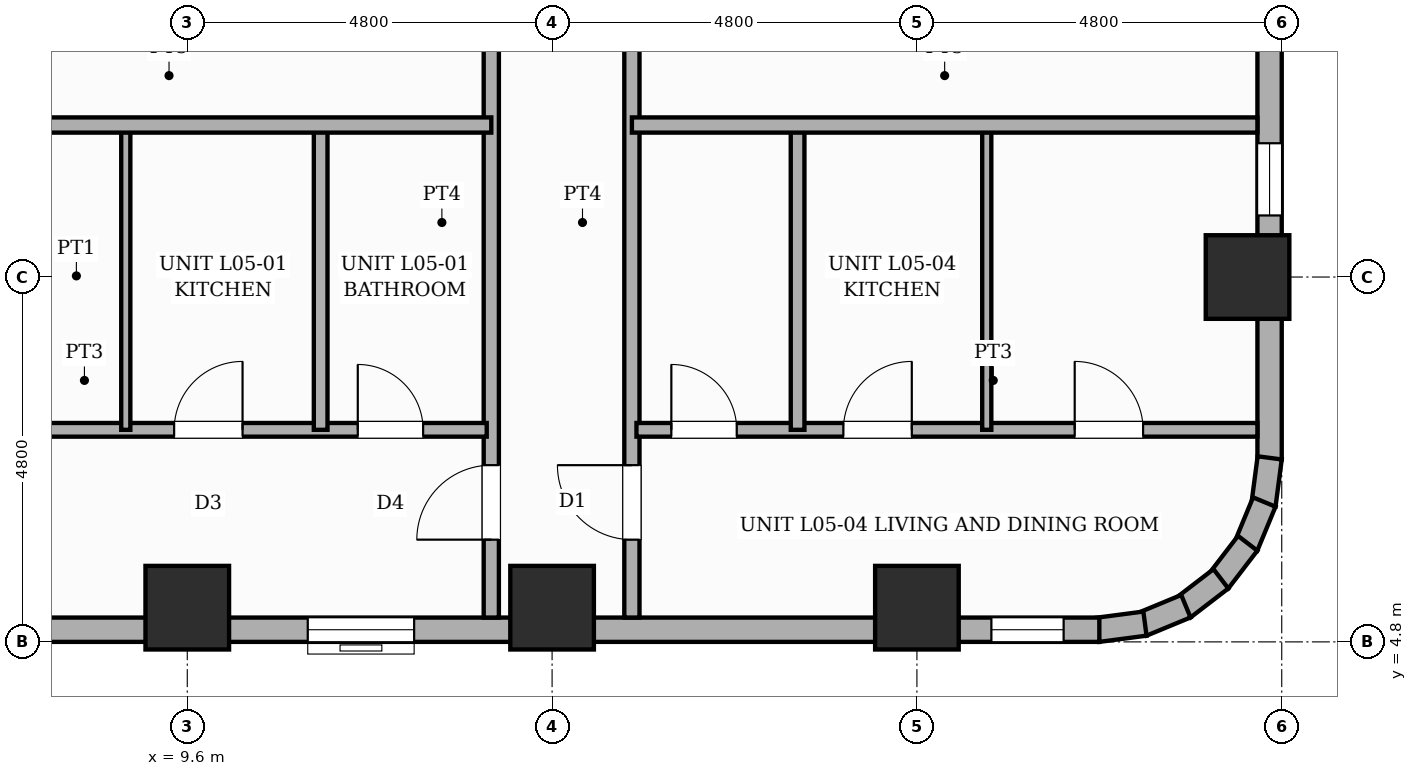
"""IFC4 building model, lengths in metres.
Left out: names, types, materials, properties, quantities, classifications, styles, units other than length and angle.
Written with IfcOpenShell. Run it as: python <this file> out.ifc"""

import sys

from ifc_helpers import new_model, si_unit, direction, frame, frame_2d, origin, origin_2d, place, context, subcontext, project, spatial, rectangle, extrude, element, fill, save


model = new_model("IFC4")
c1 = context("Model", 3, precision=1e-05, world=origin(), true_north=direction((0.0, 1.0)))
c2 = subcontext(c1, "Body", "Model", "MODEL_VIEW")
j1 = project(units=[si_unit("LENGTHUNIT", "METRE"), si_unit("PLANEANGLEUNIT", "RADIAN")], contexts=[c1])
p1 = place(None, origin())
s1 = spatial("IfcSite", under=j1, at=p1, CompositionType="ELEMENT")
p2 = place(p1, origin())
s2 = spatial("IfcBuilding", under=s1, at=p2, CompositionType="ELEMENT")
p3 = place(p2, frame((0.0, 0.0, 25.0)))
s3 = spatial("IfcBuildingStorey", under=s2, at=p3, CompositionType="ELEMENT", Elevation=25.0)
for number, where, z_axis, x_axis in (
    (1, (9.6, 5.25, 0.0), (0.0, 0.0, 1.0), (1.0, 0.0, 0.0)),
    (2, (14.4, 5.25, 0.0), (0.0, 0.0, 1.0), (1.0, 0.0, 0.0)),
    (3, (19.2, 5.25, 0.0), (0.0, 0.0, 1.0), (1.0, 0.0, 0.0)),
    (4, (23.55, 9.6, 0.0), (0.0, 0.0, 1.0), (1.0, 0.0, 0.0)),
):
    element("IfcColumn", number, at=place(p3, frame(where, z_axis=z_axis, x_axis=x_axis)), inside=s3, PredefinedType="COLUMN", context=c2, shape_type="SweptSolid", body=[
        extrude(rectangle(XDim=1.1, YDim=1.1, at=origin_2d()), origin(), (0.0, 0.0, 1.0), 3.6),
    ])
p4 = place(p3, frame((23.84, 26.4, 0.0), z_axis=(0.0, 0.0, 1.0), x_axis=(0.0, -1.0, 0.0)))
e5 = element("IfcWall", 5, at=p4, inside=s3, PredefinedType="STANDARD", context=c2, shape_type="SweptSolid", body=[
    extrude(rectangle(XDim=19.2, YDim=0.32, at=frame_2d((9.6, 0.0))), origin(), (0.0, 0.0, 1.0), 2.53),
])
p5 = place(p4, frame((15.04, 0.0, 0.45)))
e6 = element("IfcOpeningElement", 6, at=p5, cuts=e5, PredefinedType="OPENING", context=c2, shape_type="SweptSolid", body=[
    extrude(rectangle(XDim=0.95, YDim=1.8, at=frame_2d((0.475, 0.9))), frame((0.0, 0.17, 0.0), z_axis=(0.0, -1.0, 0.0), x_axis=(1.0, 0.0, 0.0)), (0.0, 0.0, 1.0), 0.34),
])
p6 = place(p4, frame((8.22, 0.0, 0.65)))
e7 = element("IfcOpeningElement", 7, at=p6, cuts=e5, PredefinedType="OPENING", context=c2, shape_type="SweptSolid", body=[
    extrude(rectangle(XDim=1.4, YDim=1.1, at=frame_2d((0.7, 0.55))), frame((0.0, 0.17, 0.0), z_axis=(0.0, -1.0, 0.0), x_axis=(1.0, 0.0, 0.0)), (0.0, 0.0, 1.0), 0.34),
])
p7 = place(p4, frame((4.795, 0.0, 0.65)))
e8 = element("IfcOpeningElement", 8, at=p7, cuts=e5, PredefinedType="OPENING", context=c2, shape_type="SweptSolid", body=[
    extrude(rectangle(XDim=1.4, YDim=1.1, at=frame_2d((0.7, 0.55))), frame((0.0, 0.17, 0.0), z_axis=(0.0, -1.0, 0.0), x_axis=(1.0, 0.0, 0.0)), (0.0, 0.0, 1.0), 0.34),
])
p8 = place(p4, frame((10.26, 0.0, 0.45)))
e9 = element("IfcOpeningElement", 9, at=p8, cuts=e5, PredefinedType="OPENING", context=c2, shape_type="SweptSolid", body=[
    extrude(rectangle(XDim=0.95, YDim=1.8, at=frame_2d((0.475, 0.9))), frame((0.0, 0.17, 0.0), z_axis=(0.0, -1.0, 0.0), x_axis=(1.0, 0.0, 0.0)), (0.0, 0.0, 1.0), 0.34),
])
p9 = place(p4, frame((0.88, 0.0, 0.45)))
e10 = element("IfcOpeningElement", 10, at=p9, cuts=e5, PredefinedType="OPENING", context=c2, shape_type="SweptSolid", body=[
    extrude(rectangle(XDim=0.75, YDim=1.8, at=frame_2d((0.375, 0.9))), frame((0.0, 0.17, 0.0), z_axis=(0.0, -1.0, 0.0), x_axis=(1.0, 0.0, 0.0)), (0.0, 0.0, 1.0), 0.34),
])
p10 = place(p3, frame((23.841, 7.221, 0.0), z_axis=(0.0, 0.0, 1.0), x_axis=(-0.130504898859, -0.991447664465, 0.0)))
e11 = element("IfcWall", 11, at=p10, inside=s3, PredefinedType="STANDARD", context=c2, shape_type="SweptSolid", body=[
    extrude(rectangle(XDim=0.627, YDim=0.32, at=frame_2d((0.313, 0.0))), origin(), (0.0, 0.0, 1.0), 3.35),
])
p11 = place(p3, frame((23.771, 6.64, 0.0), z_axis=(0.0, 0.0, 1.0), x_axis=(-0.382787856107, -0.923836271867, 0.0)))
e12 = element("IfcWall", 12, at=p11, inside=s3, PredefinedType="STANDARD", context=c2, shape_type="SweptSolid", body=[
    extrude(rectangle(XDim=0.626, YDim=0.32, at=frame_2d((0.313, 0.0))), origin(), (0.0, 0.0, 1.0), 3.35),
])
p12 = place(p3, frame((23.552, 6.097, 0.0), z_axis=(0.0, 0.0, 1.0), x_axis=(-0.608693302629, -0.793405610854, 0.0)))
e13 = element("IfcWall", 13, at=p12, inside=s3, PredefinedType="STANDARD", context=c2, shape_type="SweptSolid", body=[
    extrude(rectangle(XDim=0.626, YDim=0.32, at=frame_2d((0.313, 0.0))), origin(), (0.0, 0.0, 1.0), 3.35),
])
p13 = place(p3, frame((23.2, 5.63, 0.0), z_axis=(0.0, 0.0, 1.0), x_axis=(-0.7932174212, -0.608938521285, 0.0)))
e14 = element("IfcWall", 14, at=p13, inside=s3, PredefinedType="STANDARD", context=c2, shape_type="SweptSolid", body=[
    extrude(rectangle(XDim=0.627, YDim=0.32, at=frame_2d((0.313, 0.0))), origin(), (0.0, 0.0, 1.0), 3.35),
])
for number, where, z_axis, x_axis in (
    (15, (22.739, 5.269, 0.0), (0.0, 0.0, 1.0), (-0.924, -0.383, 0.0)),
    (16, (22.2, 5.04, 0.0), (0.0, 0.0, 1.0), (-0.991, -0.131, 0.0)),
):
    element("IfcWall", number, at=place(p3, frame(where, z_axis=z_axis, x_axis=x_axis)), inside=s3, PredefinedType="STANDARD", context=c2, shape_type="SweptSolid", body=[
        extrude(rectangle(XDim=0.626, YDim=0.32, at=frame_2d((0.313, 0.0))), origin(), (0.0, 0.0, 1.0), 3.35),
    ])
p14 = place(p3, frame((21.6, 4.96, 0.0), z_axis=(0.0, 0.0, 1.0), x_axis=(-1.0, 0.0, 0.0)))
e17 = element("IfcWall", 17, at=p14, inside=s3, PredefinedType="STANDARD", context=c2, shape_type="SweptSolid", body=[
    extrude(rectangle(XDim=14.4, YDim=0.32, at=frame_2d((7.2, 0.0))), origin(), (0.0, 0.0, 1.0), 2.53),
])
p15 = place(p14, frame((9.015, 0.0, 0.65)))
e18 = element("IfcOpeningElement", 18, at=p15, cuts=e17, PredefinedType="OPENING", context=c2, shape_type="SweptSolid", body=[
    extrude(rectangle(XDim=1.4, YDim=1.1, at=frame_2d((0.7, 0.55))), frame((0.0, 0.17, 0.0), z_axis=(0.0, -1.0, 0.0), x_axis=(1.0, 0.0, 0.0)), (0.0, 0.0, 1.0), 0.34),
])
p16 = place(p14, frame((0.47, 0.0, 0.45)))
e19 = element("IfcOpeningElement", 19, at=p16, cuts=e17, PredefinedType="OPENING", context=c2, shape_type="SweptSolid", body=[
    extrude(rectangle(XDim=0.95, YDim=1.8, at=frame_2d((0.475, 0.9))), frame((0.0, 0.17, 0.0), z_axis=(0.0, -1.0, 0.0), x_axis=(1.0, 0.0, 0.0)), (0.0, 0.0, 1.0), 0.34),
])
p17 = place(p3, frame((13.6, 5.12, 0.0), z_axis=(0.0, 0.0, 1.0), x_axis=(0.0, 1.0, 0.0)))
e20 = element("IfcWall", 20, at=p17, inside=s3, PredefinedType="PARTITIONING", context=c2, shape_type="SweptSolid", body=[
    extrude(rectangle(XDim=20.63, YDim=0.2, at=frame_2d((10.315, 0.0))), origin(), (0.0, 0.0, 1.0), 3.35),
])
p18 = place(p17, frame((1.025, 0.0, 0.0)))
e21 = element("IfcOpeningElement", 21, at=p18, cuts=e20, PredefinedType="OPENING", context=c2, shape_type="SweptSolid", body=[
    extrude(rectangle(XDim=0.98, YDim=2.18, at=frame_2d((0.49, 1.09))), frame((0.0, 0.11, 0.0), z_axis=(0.0, -1.0, 0.0), x_axis=(1.0, 0.0, 0.0)), (0.0, 0.0, 1.0), 0.22),
])
p19 = place(p17, frame((8.39, 0.0, 0.0)))
e22 = element("IfcOpeningElement", 22, at=p19, cuts=e20, PredefinedType="OPENING", context=c2, shape_type="SweptSolid", body=[
    extrude(rectangle(XDim=0.98, YDim=2.18, at=frame_2d((0.49, 1.09))), frame((0.0, 0.11, 0.0), z_axis=(0.0, -1.0, 0.0), x_axis=(1.0, 0.0, 0.0)), (0.0, 0.0, 1.0), 0.22),
])
p20 = place(p17, frame((14.71, 0.0, 0.0)))
e23 = element("IfcOpeningElement", 23, at=p20, cuts=e20, PredefinedType="OPENING", context=c2, shape_type="SweptSolid", body=[
    extrude(rectangle(XDim=0.98, YDim=2.18, at=frame_2d((0.49, 1.09))), frame((0.0, 0.11, 0.0), z_axis=(0.0, -1.0, 0.0), x_axis=(1.0, 0.0, 0.0)), (0.0, 0.0, 1.0), 0.22),
])
p21 = place(p3, frame((15.45, 5.12, 0.0), z_axis=(0.0, 0.0, 1.0), x_axis=(0.0, 1.0, 0.0)))
e24 = element("IfcWall", 24, at=p21, inside=s3, PredefinedType="PARTITIONING", context=c2, shape_type="SweptSolid", body=[
    extrude(rectangle(XDim=20.63, YDim=0.2, at=frame_2d((10.315, 0.0))), origin(), (0.0, 0.0, 1.0), 3.35),
])
p22 = place(p21, frame((1.025, 0.0, 0.0)))
e25 = element("IfcOpeningElement", 25, at=p22, cuts=e24, PredefinedType="OPENING", context=c2, shape_type="SweptSolid", body=[
    extrude(rectangle(XDim=0.98, YDim=2.18, at=frame_2d((0.49, 1.09))), frame((0.0, 0.11, 0.0), z_axis=(0.0, -1.0, 0.0), x_axis=(1.0, 0.0, 0.0)), (0.0, 0.0, 1.0), 0.22),
])
p23 = place(p21, frame((8.39, 0.0, 0.0)))
e26 = element("IfcOpeningElement", 26, at=p23, cuts=e24, PredefinedType="OPENING", context=c2, shape_type="SweptSolid", body=[
    extrude(rectangle(XDim=0.98, YDim=2.18, at=frame_2d((0.49, 1.09))), frame((0.0, 0.11, 0.0), z_axis=(0.0, -1.0, 0.0), x_axis=(1.0, 0.0, 0.0)), (0.0, 0.0, 1.0), 0.22),
])
p24 = place(p21, frame((14.71, 0.0, 0.0)))
e27 = element("IfcOpeningElement", 27, at=p24, cuts=e24, PredefinedType="OPENING", context=c2, shape_type="SweptSolid", body=[
    extrude(rectangle(XDim=0.98, YDim=2.18, at=frame_2d((0.49, 1.09))), frame((0.0, 0.11, 0.0), z_axis=(0.0, -1.0, 0.0), x_axis=(1.0, 0.0, 0.0)), (0.0, 0.0, 1.0), 0.22),
])
p25 = place(p3, frame((5.12, 7.59, 0.0), z_axis=(0.0, 0.0, 1.0), x_axis=(1.0, 0.0, 0.0)))
e28 = element("IfcWall", 28, at=p25, inside=s3, PredefinedType="PLUMBINGWALL", context=c2, shape_type="SweptSolid", body=[
    extrude(rectangle(XDim=8.42, YDim=0.18, at=frame_2d((4.21, 0.0))), origin(), (0.0, 0.0, 1.0), 3.35),
])
p26 = place(p25, frame((1.046, 0.0, 0.0)))
e29 = element("IfcOpeningElement", 29, at=p26, cuts=e28, PredefinedType="OPENING", context=c2, shape_type="SweptSolid", body=[
    extrude(rectangle(XDim=0.9, YDim=2.15, at=frame_2d((0.45, 1.075))), frame((0.0, 0.1, 0.0), z_axis=(0.0, -1.0, 0.0), x_axis=(1.0, 0.0, 0.0)), (0.0, 0.0, 1.0), 0.2),
])
p27 = place(p25, frame((4.307, 0.0, 0.0)))
e30 = element("IfcOpeningElement", 30, at=p27, cuts=e28, PredefinedType="OPENING", context=c2, shape_type="SweptSolid", body=[
    extrude(rectangle(XDim=0.9, YDim=2.15, at=frame_2d((0.45, 1.075))), frame((0.0, 0.1, 0.0), z_axis=(0.0, -1.0, 0.0), x_axis=(1.0, 0.0, 0.0)), (0.0, 0.0, 1.0), 0.2),
])
p28 = place(p25, frame((6.723, 0.0, 0.0)))
e31 = element("IfcOpeningElement", 31, at=p28, cuts=e28, PredefinedType="OPENING", context=c2, shape_type="SweptSolid", body=[
    extrude(rectangle(XDim=0.86, YDim=2.1, at=frame_2d((0.43, 1.05))), frame((0.0, 0.1, 0.0), z_axis=(0.0, -1.0, 0.0), x_axis=(1.0, 0.0, 0.0)), (0.0, 0.0, 1.0), 0.2),
])
p29 = place(p3, frame((8.791, 7.59, 0.0), z_axis=(0.0, 0.0, 1.0), x_axis=(0.0, 1.0, 0.0)))
e32 = element("IfcWall", 32, at=p29, inside=s3, PredefinedType="PARTITIONING", context=c2, shape_type="SweptSolid", body=[
    extrude(rectangle(XDim=4.05, YDim=0.12, at=frame_2d((2.025, 0.0))), origin(), (0.0, 0.0, 1.0), 3.35),
])
p30 = place(p3, frame((11.355, 7.59, 0.0), z_axis=(0.0, 0.0, 1.0), x_axis=(0.0, 1.0, 0.0)))
e33 = element("IfcWall", 33, at=p30, inside=s3, PredefinedType="PLUMBINGWALL", context=c2, shape_type="SweptSolid", body=[
    extrude(rectangle(XDim=4.05, YDim=0.18, at=frame_2d((2.025, 0.0))), origin(), (0.0, 0.0, 1.0), 3.35),
])
p31 = place(p3, frame((5.12, 11.6, 0.0), z_axis=(0.0, 0.0, 1.0), x_axis=(1.0, 0.0, 0.0)))
e34 = element("IfcWall", 34, at=p31, inside=s3, PredefinedType="SOLIDWALL", context=c2, shape_type="SweptSolid", body=[
    extrude(rectangle(XDim=8.48, YDim=0.2, at=frame_2d((4.24, 0.0))), origin(), (0.0, 0.0, 1.0), 3.35),
])
p32 = place(p3, frame((15.51, 7.59, 0.0), z_axis=(0.0, 0.0, 1.0), x_axis=(1.0, 0.0, 0.0)))
e35 = element("IfcWall", 35, at=p32, inside=s3, PredefinedType="PLUMBINGWALL", context=c2, shape_type="SweptSolid", body=[
    extrude(rectangle(XDim=8.17, YDim=0.18, at=frame_2d((4.085, 0.0))), origin(), (0.0, 0.0, 1.0), 3.35),
])
p33 = place(p32, frame((0.459, 0.0, 0.0)))
e36 = element("IfcOpeningElement", 36, at=p33, cuts=e35, PredefinedType="OPENING", context=c2, shape_type="SweptSolid", body=[
    extrude(rectangle(XDim=0.86, YDim=2.1, at=frame_2d((0.43, 1.05))), frame((0.0, 0.1, 0.0), z_axis=(0.0, -1.0, 0.0), x_axis=(1.0, 0.0, 0.0)), (0.0, 0.0, 1.0), 0.2),
])
p34 = place(p32, frame((2.722, 0.0, 0.0)))
e37 = element("IfcOpeningElement", 37, at=p34, cuts=e35, PredefinedType="OPENING", context=c2, shape_type="SweptSolid", body=[
    extrude(rectangle(XDim=0.9, YDim=2.15, at=frame_2d((0.45, 1.075))), frame((0.0, 0.1, 0.0), z_axis=(0.0, -1.0, 0.0), x_axis=(1.0, 0.0, 0.0)), (0.0, 0.0, 1.0), 0.2),
])
p35 = place(p32, frame((5.766, 0.0, 0.0)))
e38 = element("IfcOpeningElement", 38, at=p35, cuts=e35, PredefinedType="OPENING", context=c2, shape_type="SweptSolid", body=[
    extrude(rectangle(XDim=0.9, YDim=2.15, at=frame_2d((0.45, 1.075))), frame((0.0, 0.1, 0.0), z_axis=(0.0, -1.0, 0.0), x_axis=(1.0, 0.0, 0.0)), (0.0, 0.0, 1.0), 0.2),
])
p36 = place(p3, frame((17.63, 7.59, 0.0), z_axis=(0.0, 0.0, 1.0), x_axis=(0.0, 1.0, 0.0)))
e39 = element("IfcWall", 39, at=p36, inside=s3, PredefinedType="PLUMBINGWALL", context=c2, shape_type="SweptSolid", body=[
    extrude(rectangle(XDim=4.05, YDim=0.18, at=frame_2d((2.025, 0.0))), origin(), (0.0, 0.0, 1.0), 3.35),
])
p37 = place(p3, frame((20.119, 7.59, 0.0), z_axis=(0.0, 0.0, 1.0), x_axis=(0.0, 1.0, 0.0)))
e40 = element("IfcWall", 40, at=p37, inside=s3, PredefinedType="PARTITIONING", context=c2, shape_type="SweptSolid", body=[
    extrude(rectangle(XDim=4.05, YDim=0.12, at=frame_2d((2.025, 0.0))), origin(), (0.0, 0.0, 1.0), 3.35),
])
p38 = place(p3, frame((15.45, 11.6, 0.0), z_axis=(0.0, 0.0, 1.0), x_axis=(1.0, 0.0, 0.0)))
e41 = element("IfcWall", 41, at=p38, inside=s3, PredefinedType="SOLIDWALL", context=c2, shape_type="SweptSolid", body=[
    extrude(rectangle(XDim=8.23, YDim=0.2, at=frame_2d((4.115, 0.0))), origin(), (0.0, 0.0, 1.0), 3.35),
])
p39 = place(p5, origin())
e42 = element("IfcWindow", 42, at=p39, inside=s3, PartitioningType="SINGLE_PANEL", PredefinedType="WINDOW", context=c2, shape_type="SweptSolid", body=[
    extrude(rectangle(XDim=0.95, YDim=1.8, at=frame_2d((0.475, 0.9))), frame((0.0, 0.03, 0.0), z_axis=(0.0, -1.0, 0.0), x_axis=(1.0, 0.0, 0.0)), (0.0, 0.0, 1.0), 0.06),
])
fill(e6, e42)
p40 = place(p15, origin())
e43 = element("IfcWindow", 43, at=p40, inside=s3, PartitioningType="SINGLE_PANEL", PredefinedType="WINDOW", context=c2, shape_type="SweptSolid", body=[
    extrude(rectangle(XDim=1.4, YDim=1.1, at=frame_2d((0.7, 0.55))), frame((0.0, 0.03, 0.0), z_axis=(0.0, -1.0, 0.0), x_axis=(1.0, 0.0, 0.0)), (0.0, 0.0, 1.0), 0.06),
])
fill(e18, e43)
p41 = place(p16, origin())
e44 = element("IfcWindow", 44, at=p41, inside=s3, PartitioningType="SINGLE_PANEL", PredefinedType="WINDOW", context=c2, shape_type="SweptSolid", body=[
    extrude(rectangle(XDim=0.95, YDim=1.8, at=frame_2d((0.475, 0.9))), frame((0.0, 0.03, 0.0), z_axis=(0.0, -1.0, 0.0), x_axis=(1.0, 0.0, 0.0)), (0.0, 0.0, 1.0), 0.06),
])
fill(e19, e44)
p42 = place(p18, origin())
e45 = element("IfcDoor", 45, at=p42, inside=s3, OperationType="SINGLE_SWING_LEFT", PredefinedType="DOOR", context=c2, shape_type="SweptSolid", body=[
    extrude(rectangle(XDim=0.98, YDim=2.18, at=frame_2d((0.49, 1.09))), frame((0.0, 0.025, 0.0), z_axis=(0.0, -1.0, 0.0), x_axis=(1.0, 0.0, 0.0)), (0.0, 0.0, 1.0), 0.05),
])
fill(e21, e45)
p43 = place(p27, origin())
e46 = element("IfcDoor", 46, at=p43, inside=s3, OperationType="SINGLE_SWING_RIGHT", PredefinedType="DOOR", context=c2, shape_type="SweptSolid", body=[
    extrude(rectangle(XDim=0.9, YDim=2.15, at=frame_2d((0.45, 1.075))), frame((0.0, 0.025, 0.0), z_axis=(0.0, -1.0, 0.0), x_axis=(1.0, 0.0, 0.0)), (0.0, 0.0, 1.0), 0.05),
])
fill(e30, e46)
p44 = place(p28, origin())
e47 = element("IfcDoor", 47, at=p44, inside=s3, OperationType="SINGLE_SWING_LEFT", PredefinedType="DOOR", context=c2, shape_type="SweptSolid", body=[
    extrude(rectangle(XDim=0.86, YDim=2.1, at=frame_2d((0.43, 1.05))), frame((0.0, 0.025, 0.0), z_axis=(0.0, -1.0, 0.0), x_axis=(1.0, 0.0, 0.0)), (0.0, 0.0, 1.0), 0.05),
])
fill(e31, e47)
p45 = place(p22, origin())
e48 = element("IfcDoor", 48, at=p45, inside=s3, OperationType="SINGLE_SWING_RIGHT", PredefinedType="DOOR", context=c2, shape_type="SweptSolid", body=[
    extrude(rectangle(XDim=0.98, YDim=2.18, at=frame_2d((0.49, 1.09))), frame((0.0, 0.025, 0.0), z_axis=(0.0, -1.0, 0.0), x_axis=(1.0, 0.0, 0.0)), (0.0, 0.0, 1.0), 0.05),
])
fill(e25, e48)
p46 = place(p33, origin())
e49 = element("IfcDoor", 49, at=p46, inside=s3, OperationType="SINGLE_SWING_LEFT", PredefinedType="DOOR", context=c2, shape_type="SweptSolid", body=[
    extrude(rectangle(XDim=0.86, YDim=2.1, at=frame_2d((0.43, 1.05))), frame((0.0, 0.025, 0.0), z_axis=(0.0, -1.0, 0.0), x_axis=(1.0, 0.0, 0.0)), (0.0, 0.0, 1.0), 0.05),
])
fill(e36, e49)
p47 = place(p34, origin())
e50 = element("IfcDoor", 50, at=p47, inside=s3, OperationType="SINGLE_SWING_RIGHT", PredefinedType="DOOR", context=c2, shape_type="SweptSolid", body=[
    extrude(rectangle(XDim=0.9, YDim=2.15, at=frame_2d((0.45, 1.075))), frame((0.0, 0.025, 0.0), z_axis=(0.0, -1.0, 0.0), x_axis=(1.0, 0.0, 0.0)), (0.0, 0.0, 1.0), 0.05),
])
fill(e37, e50)
p48 = place(p35, origin())
e51 = element("IfcDoor", 51, at=p48, inside=s3, OperationType="SINGLE_SWING_LEFT", PredefinedType="DOOR", context=c2, shape_type="SweptSolid", body=[
    extrude(rectangle(XDim=0.9, YDim=2.15, at=frame_2d((0.45, 1.075))), frame((0.0, 0.025, 0.0), z_axis=(0.0, -1.0, 0.0), x_axis=(1.0, 0.0, 0.0)), (0.0, 0.0, 1.0), 0.05),
])
fill(e38, e51)
save(model, sys.argv[1])
